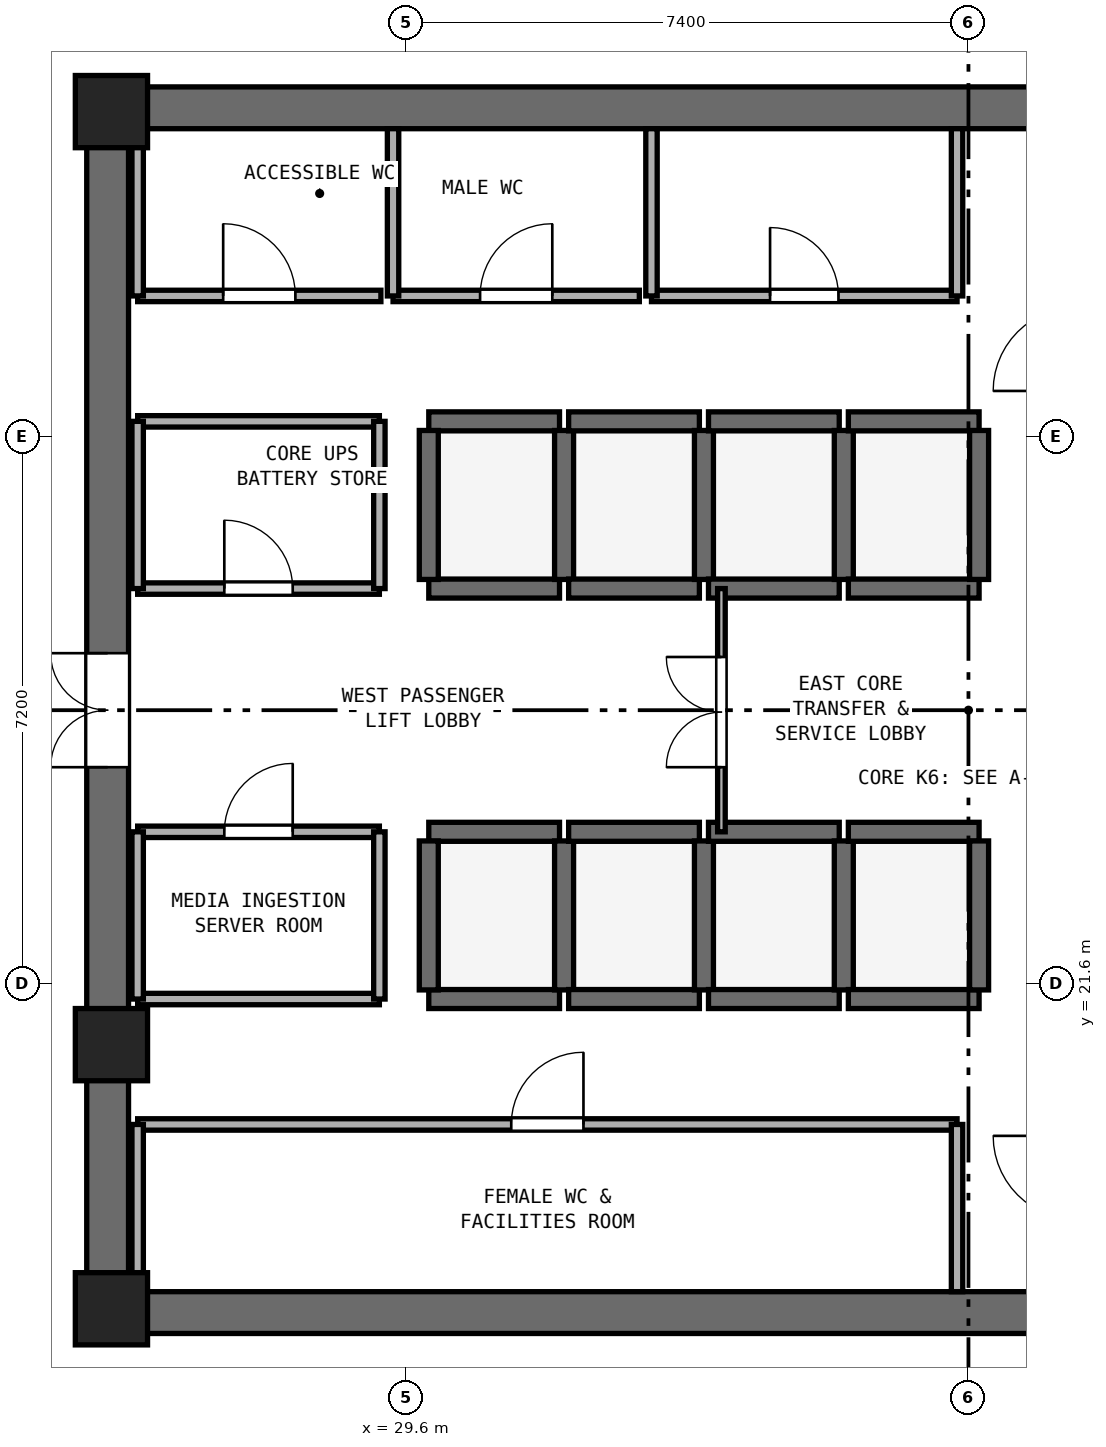
"""IFC4 building model, lengths in metres.
Left out: names, types, materials, properties, quantities, classifications, styles, units other than length and angle.
Written with IfcOpenShell. Run it as: python <this file> out.ifc"""

import sys

from ifc_helpers import new_model, si_unit, direction, frame, frame_2d, origin, origin_2d, place, context, subcontext, project, spatial, rectangle, extrude, element, fill, save


model = new_model("IFC4")
c1 = context("Model", 3, precision=1e-05, world=origin(), true_north=direction((0.0, 1.0)))
c2 = subcontext(c1, "Body", "Model", "MODEL_VIEW")
j1 = project(units=[si_unit("LENGTHUNIT", "METRE"), si_unit("PLANEANGLEUNIT", "RADIAN")], contexts=[c1])
p1 = place(None, origin())
s1 = spatial("IfcSite", under=j1, at=p1, CompositionType="ELEMENT")
p2 = place(p1, origin())
s2 = spatial("IfcBuilding", under=s1, at=p2, CompositionType="ELEMENT")
p3 = place(p2, frame((0.0, 0.0, 220.0)))
s3 = spatial("IfcBuildingStorey", under=s2, at=p3, CompositionType="ELEMENT", Elevation=220.0)
for number, where, z_axis, x_axis in (
    (1, (25.4, 17.275, 0.0), (0.0, 0.0, 1.0), (1.0, 0.0, 0.0)),
    (2, (25.4, 33.125, 0.0), (0.0, 0.0, 1.0), (1.0, 0.0, 0.0)),
):
    element("IfcWall", number, at=place(p3, frame(where, z_axis=z_axis, x_axis=x_axis)), inside=s3, PredefinedType="SHEAR", context=c2, shape_type="SweptSolid", body=[
        extrude(rectangle(XDim=23.2, YDim=0.55, at=frame_2d((11.6, 0.0))), origin(), (0.0, 0.0, 1.0), 4.71),
    ])
p4 = place(p3, frame((25.675, 17.55, 0.0), z_axis=(0.0, 0.0, 1.0), x_axis=(0.0, 1.0, 0.0)))
e3 = element("IfcWall", 3, at=p4, inside=s3, PredefinedType="SHEAR", context=c2, shape_type="SweptSolid", body=[
    extrude(rectangle(XDim=15.3, YDim=0.55, at=frame_2d((7.65, 0.0))), origin(), (0.0, 0.0, 1.0), 4.71),
])
p5 = place(p4, frame((6.9, 0.0, 0.0)))
e4 = element("IfcOpeningElement", 4, at=p5, cuts=e3, PredefinedType="OPENING", context=c2, shape_type="SweptSolid", body=[
    extrude(rectangle(XDim=1.5, YDim=2.15, at=frame_2d((0.75, 1.075))), frame((0.0, 0.285, 0.0), z_axis=(0.0, -1.0, 0.0), x_axis=(1.0, 0.0, 0.0)), (0.0, 0.0, 1.0), 0.57),
])
for number, where, z_axis, x_axis in (
    (5, (25.725, 17.325, 0.0), (0.0, 0.0, 1.0), (1.0, 0.0, 0.0)),
    (6, (25.725, 33.075, 0.0), (0.0, 0.0, 1.0), (1.0, 0.0, 0.0)),
    (7, (25.725, 20.8, 0.0), (0.0, 0.0, 1.0), (1.0, 0.0, 0.0)),
):
    element("IfcColumn", number, at=place(p3, frame(where, z_axis=z_axis, x_axis=x_axis)), inside=s3, PredefinedType="PILASTER", context=c2, shape_type="SweptSolid", body=[
        extrude(rectangle(XDim=0.95, YDim=0.95, at=origin_2d()), origin(), (0.0, 0.0, 1.0), 5.0),
    ])
for number, where, z_axis, x_axis in (
    (8, (29.9, 21.4, 0.0), (0.0, 0.0, 1.0), (1.0, 0.0, 0.0)),
    (9, (29.9, 23.6, 0.0), (0.0, 0.0, 1.0), (1.0, 0.0, 0.0)),
):
    element("IfcWall", number, at=place(p3, frame(where, z_axis=z_axis, x_axis=x_axis)), inside=s3, PredefinedType="SHEAR", context=c2, shape_type="SweptSolid", body=[
        extrude(rectangle(XDim=1.72, YDim=0.25, at=frame_2d((0.86, 0.0))), origin(), (0.0, 0.0, 1.0), 4.71),
    ])
for number, where, z_axis, x_axis in (
    (10, (29.9, 21.52, 0.0), (0.0, 0.0, 1.0), (0.0, 1.0, 0.0)),
    (11, (31.68, 21.52, 0.0), (0.0, 0.0, 1.0), (0.0, 1.0, 0.0)),
):
    element("IfcWall", number, at=place(p3, frame(where, z_axis=z_axis, x_axis=x_axis)), inside=s3, PredefinedType="SHEAR", context=c2, shape_type="SweptSolid", body=[
        extrude(rectangle(XDim=1.96, YDim=0.25, at=frame_2d((0.98, 0.0))), origin(), (0.0, 0.0, 1.0), 4.71),
    ])
for number, where, z_axis, x_axis in (
    (12, (31.74, 21.4, 0.0), (0.0, 0.0, 1.0), (1.0, 0.0, 0.0)),
    (13, (31.74, 23.6, 0.0), (0.0, 0.0, 1.0), (1.0, 0.0, 0.0)),
):
    element("IfcWall", number, at=place(p3, frame(where, z_axis=z_axis, x_axis=x_axis)), inside=s3, PredefinedType="SHEAR", context=c2, shape_type="SweptSolid", body=[
        extrude(rectangle(XDim=1.72, YDim=0.25, at=frame_2d((0.86, 0.0))), origin(), (0.0, 0.0, 1.0), 4.71),
    ])
p6 = place(p3, frame((33.52, 21.52, 0.0), z_axis=(0.0, 0.0, 1.0), x_axis=(0.0, 1.0, 0.0)))
e14 = element("IfcWall", 14, at=p6, inside=s3, PredefinedType="SHEAR", context=c2, shape_type="SweptSolid", body=[
    extrude(rectangle(XDim=1.96, YDim=0.25, at=frame_2d((0.98, 0.0))), origin(), (0.0, 0.0, 1.0), 4.71),
])
for number, where, z_axis, x_axis in (
    (15, (33.58, 21.4, 0.0), (0.0, 0.0, 1.0), (1.0, 0.0, 0.0)),
    (16, (33.58, 23.6, 0.0), (0.0, 0.0, 1.0), (1.0, 0.0, 0.0)),
):
    element("IfcWall", number, at=place(p3, frame(where, z_axis=z_axis, x_axis=x_axis)), inside=s3, PredefinedType="SHEAR", context=c2, shape_type="SweptSolid", body=[
        extrude(rectangle(XDim=1.72, YDim=0.25, at=frame_2d((0.86, 0.0))), origin(), (0.0, 0.0, 1.0), 4.71),
    ])
p7 = place(p3, frame((35.36, 21.52, 0.0), z_axis=(0.0, 0.0, 1.0), x_axis=(0.0, 1.0, 0.0)))
e17 = element("IfcWall", 17, at=p7, inside=s3, PredefinedType="SHEAR", context=c2, shape_type="SweptSolid", body=[
    extrude(rectangle(XDim=1.96, YDim=0.25, at=frame_2d((0.98, 0.0))), origin(), (0.0, 0.0, 1.0), 4.71),
])
for number, where, z_axis, x_axis in (
    (18, (35.42, 21.4, 0.0), (0.0, 0.0, 1.0), (1.0, 0.0, 0.0)),
    (19, (35.42, 23.6, 0.0), (0.0, 0.0, 1.0), (1.0, 0.0, 0.0)),
):
    element("IfcWall", number, at=place(p3, frame(where, z_axis=z_axis, x_axis=x_axis)), inside=s3, PredefinedType="SHEAR", context=c2, shape_type="SweptSolid", body=[
        extrude(rectangle(XDim=1.72, YDim=0.25, at=frame_2d((0.86, 0.0))), origin(), (0.0, 0.0, 1.0), 4.71),
    ])
p8 = place(p3, frame((37.14, 21.52, 0.0), z_axis=(0.0, 0.0, 1.0), x_axis=(0.0, 1.0, 0.0)))
e20 = element("IfcWall", 20, at=p8, inside=s3, PredefinedType="SHEAR", context=c2, shape_type="SweptSolid", body=[
    extrude(rectangle(XDim=1.96, YDim=0.25, at=frame_2d((0.98, 0.0))), origin(), (0.0, 0.0, 1.0), 4.71),
])
for number, where, z_axis, x_axis in (
    (21, (29.9, 26.8, 0.0), (0.0, 0.0, 1.0), (1.0, 0.0, 0.0)),
    (22, (29.9, 29.0, 0.0), (0.0, 0.0, 1.0), (1.0, 0.0, 0.0)),
):
    element("IfcWall", number, at=place(p3, frame(where, z_axis=z_axis, x_axis=x_axis)), inside=s3, PredefinedType="SHEAR", context=c2, shape_type="SweptSolid", body=[
        extrude(rectangle(XDim=1.72, YDim=0.25, at=frame_2d((0.86, 0.0))), origin(), (0.0, 0.0, 1.0), 4.71),
    ])
for number, where, z_axis, x_axis in (
    (23, (29.9, 26.92, 0.0), (0.0, 0.0, 1.0), (0.0, 1.0, 0.0)),
    (24, (31.68, 26.92, 0.0), (0.0, 0.0, 1.0), (0.0, 1.0, 0.0)),
):
    element("IfcWall", number, at=place(p3, frame(where, z_axis=z_axis, x_axis=x_axis)), inside=s3, PredefinedType="SHEAR", context=c2, shape_type="SweptSolid", body=[
        extrude(rectangle(XDim=1.96, YDim=0.25, at=frame_2d((0.98, 0.0))), origin(), (0.0, 0.0, 1.0), 4.71),
    ])
for number, where, z_axis, x_axis in (
    (25, (31.74, 26.8, 0.0), (0.0, 0.0, 1.0), (1.0, 0.0, 0.0)),
    (26, (31.74, 29.0, 0.0), (0.0, 0.0, 1.0), (1.0, 0.0, 0.0)),
):
    element("IfcWall", number, at=place(p3, frame(where, z_axis=z_axis, x_axis=x_axis)), inside=s3, PredefinedType="SHEAR", context=c2, shape_type="SweptSolid", body=[
        extrude(rectangle(XDim=1.72, YDim=0.25, at=frame_2d((0.86, 0.0))), origin(), (0.0, 0.0, 1.0), 4.71),
    ])
p9 = place(p3, frame((33.52, 26.92, 0.0), z_axis=(0.0, 0.0, 1.0), x_axis=(0.0, 1.0, 0.0)))
e27 = element("IfcWall", 27, at=p9, inside=s3, PredefinedType="SHEAR", context=c2, shape_type="SweptSolid", body=[
    extrude(rectangle(XDim=1.96, YDim=0.25, at=frame_2d((0.98, 0.0))), origin(), (0.0, 0.0, 1.0), 4.71),
])
for number, where, z_axis, x_axis in (
    (28, (33.58, 26.8, 0.0), (0.0, 0.0, 1.0), (1.0, 0.0, 0.0)),
    (29, (33.58, 29.0, 0.0), (0.0, 0.0, 1.0), (1.0, 0.0, 0.0)),
):
    element("IfcWall", number, at=place(p3, frame(where, z_axis=z_axis, x_axis=x_axis)), inside=s3, PredefinedType="SHEAR", context=c2, shape_type="SweptSolid", body=[
        extrude(rectangle(XDim=1.72, YDim=0.25, at=frame_2d((0.86, 0.0))), origin(), (0.0, 0.0, 1.0), 4.71),
    ])
p10 = place(p3, frame((35.36, 26.92, 0.0), z_axis=(0.0, 0.0, 1.0), x_axis=(0.0, 1.0, 0.0)))
e30 = element("IfcWall", 30, at=p10, inside=s3, PredefinedType="SHEAR", context=c2, shape_type="SweptSolid", body=[
    extrude(rectangle(XDim=1.96, YDim=0.25, at=frame_2d((0.98, 0.0))), origin(), (0.0, 0.0, 1.0), 4.71),
])
for number, where, z_axis, x_axis in (
    (31, (35.42, 26.8, 0.0), (0.0, 0.0, 1.0), (1.0, 0.0, 0.0)),
    (32, (35.42, 29.0, 0.0), (0.0, 0.0, 1.0), (1.0, 0.0, 0.0)),
):
    element("IfcWall", number, at=place(p3, frame(where, z_axis=z_axis, x_axis=x_axis)), inside=s3, PredefinedType="SHEAR", context=c2, shape_type="SweptSolid", body=[
        extrude(rectangle(XDim=1.72, YDim=0.25, at=frame_2d((0.86, 0.0))), origin(), (0.0, 0.0, 1.0), 4.71),
    ])
p11 = place(p3, frame((37.14, 26.92, 0.0), z_axis=(0.0, 0.0, 1.0), x_axis=(0.0, 1.0, 0.0)))
e33 = element("IfcWall", 33, at=p11, inside=s3, PredefinedType="SHEAR", context=c2, shape_type="SweptSolid", body=[
    extrude(rectangle(XDim=1.96, YDim=0.25, at=frame_2d((0.98, 0.0))), origin(), (0.0, 0.0, 1.0), 4.71),
])
p12 = place(p3, frame((26.07, 30.65, 0.0), z_axis=(0.0, 0.0, 1.0), x_axis=(1.0, 0.0, 0.0)))
e34 = element("IfcWall", 34, at=p12, inside=s3, PredefinedType="PARTITIONING", context=c2, shape_type="SweptSolid", body=[
    extrude(rectangle(XDim=3.2, YDim=0.15, at=frame_2d((1.6, 0.0))), origin(), (0.0, 0.0, 1.0), 4.71),
])
p13 = place(p12, frame((1.125, 0.0, 0.0)))
e35 = element("IfcOpeningElement", 35, at=p13, cuts=e34, PredefinedType="OPENING", context=c2, shape_type="SweptSolid", body=[
    extrude(rectangle(XDim=0.95, YDim=2.1, at=frame_2d((0.475, 1.05))), frame((0.0, 0.085, 0.0), z_axis=(0.0, -1.0, 0.0), x_axis=(1.0, 0.0, 0.0)), (0.0, 0.0, 1.0), 0.17),
])
p14 = place(p3, frame((26.07, 30.65, 0.0), z_axis=(0.0, 0.0, 1.0), x_axis=(0.0, 1.0, 0.0)))
e36 = element("IfcWall", 36, at=p14, inside=s3, PredefinedType="PARTITIONING", context=c2, shape_type="SweptSolid", body=[
    extrude(rectangle(XDim=2.2, YDim=0.15, at=frame_2d((1.1, 0.0))), origin(), (0.0, 0.0, 1.0), 3.81),
])
p15 = place(p3, frame((29.43, 30.65, 0.0), z_axis=(0.0, 0.0, 1.0), x_axis=(1.0, 0.0, 0.0)))
e37 = element("IfcWall", 37, at=p15, inside=s3, PredefinedType="PARTITIONING", context=c2, shape_type="SweptSolid", body=[
    extrude(rectangle(XDim=3.24, YDim=0.15, at=frame_2d((1.62, 0.0))), origin(), (0.0, 0.0, 1.0), 4.71),
])
p16 = place(p15, frame((1.145, 0.0, 0.0)))
e38 = element("IfcOpeningElement", 38, at=p16, cuts=e37, PredefinedType="OPENING", context=c2, shape_type="SweptSolid", body=[
    extrude(rectangle(XDim=0.95, YDim=2.1, at=frame_2d((0.475, 1.05))), frame((0.0, 0.085, 0.0), z_axis=(0.0, -1.0, 0.0), x_axis=(1.0, 0.0, 0.0)), (0.0, 0.0, 1.0), 0.17),
])
p17 = place(p3, frame((29.43, 30.65, 0.0), z_axis=(0.0, 0.0, 1.0), x_axis=(0.0, 1.0, 0.0)))
e39 = element("IfcWall", 39, at=p17, inside=s3, PredefinedType="PARTITIONING", context=c2, shape_type="SweptSolid", body=[
    extrude(rectangle(XDim=2.2, YDim=0.15, at=frame_2d((1.1, 0.0))), origin(), (0.0, 0.0, 1.0), 4.71),
])
p18 = place(p3, frame((32.83, 30.65, 0.0), z_axis=(0.0, 0.0, 1.0), x_axis=(1.0, 0.0, 0.0)))
e40 = element("IfcWall", 40, at=p18, inside=s3, PredefinedType="PARTITIONING", context=c2, shape_type="SweptSolid", body=[
    extrude(rectangle(XDim=4.02, YDim=0.15, at=frame_2d((2.01, 0.0))), origin(), (0.0, 0.0, 1.0), 4.71),
])
p19 = place(p18, frame((1.56, 0.0, 0.0)))
e41 = element("IfcOpeningElement", 41, at=p19, cuts=e40, PredefinedType="OPENING", context=c2, shape_type="SweptSolid", body=[
    extrude(rectangle(XDim=0.9, YDim=2.1, at=frame_2d((0.45, 1.05))), frame((0.0, 0.085, 0.0), z_axis=(0.0, -1.0, 0.0), x_axis=(1.0, 0.0, 0.0)), (0.0, 0.0, 1.0), 0.17),
])
for number, where, z_axis, x_axis in (
    (42, (32.83, 30.65, 0.0), (0.0, 0.0, 1.0), (0.0, 1.0, 0.0)),
    (43, (36.85, 30.65, 0.0), (0.0, 0.0, 1.0), (0.0, 1.0, 0.0)),
):
    element("IfcWall", number, at=place(p3, frame(where, z_axis=z_axis, x_axis=x_axis)), inside=s3, PredefinedType="PARTITIONING", context=c2, shape_type="SweptSolid", body=[
        extrude(rectangle(XDim=2.2, YDim=0.15, at=frame_2d((1.1, 0.0))), origin(), (0.0, 0.0, 1.0), 4.71),
    ])
p20 = place(p3, frame((26.07, 19.75, 0.0), z_axis=(0.0, 0.0, 1.0), x_axis=(1.0, 0.0, 0.0)))
e44 = element("IfcWall", 44, at=p20, inside=s3, PredefinedType="PARTITIONING", context=c2, shape_type="SweptSolid", body=[
    extrude(rectangle(XDim=10.78, YDim=0.15, at=frame_2d((5.39, 0.0))), origin(), (0.0, 0.0, 1.0), 4.71),
])
p21 = place(p20, frame((4.915, 0.0, 0.0)))
e45 = element("IfcOpeningElement", 45, at=p21, cuts=e44, PredefinedType="OPENING", context=c2, shape_type="SweptSolid", body=[
    extrude(rectangle(XDim=0.95, YDim=2.1, at=frame_2d((0.475, 1.05))), frame((0.0, 0.085, 0.0), z_axis=(0.0, -1.0, 0.0), x_axis=(1.0, 0.0, 0.0)), (0.0, 0.0, 1.0), 0.17),
])
p22 = place(p3, frame((26.07, 17.55, 0.0), z_axis=(0.0, 0.0, 1.0), x_axis=(0.0, 1.0, 0.0)))
e46 = element("IfcWall", 46, at=p22, inside=s3, PredefinedType="PARTITIONING", context=c2, shape_type="SweptSolid", body=[
    extrude(rectangle(XDim=2.2, YDim=0.15, at=frame_2d((1.1, 0.0))), origin(), (0.0, 0.0, 1.0), 3.81),
])
p23 = place(p3, frame((36.85, 17.55, 0.0), z_axis=(0.0, 0.0, 1.0), x_axis=(0.0, 1.0, 0.0)))
e47 = element("IfcWall", 47, at=p23, inside=s3, PredefinedType="PARTITIONING", context=c2, shape_type="SweptSolid", body=[
    extrude(rectangle(XDim=2.2, YDim=0.15, at=frame_2d((1.1, 0.0))), origin(), (0.0, 0.0, 1.0), 4.71),
])
p24 = place(p3, frame((26.07, 26.8, 0.0), z_axis=(0.0, 0.0, 1.0), x_axis=(1.0, 0.0, 0.0)))
e48 = element("IfcWall", 48, at=p24, inside=s3, PredefinedType="PARTITIONING", context=c2, shape_type="SweptSolid", body=[
    extrude(rectangle(XDim=3.18, YDim=0.15, at=frame_2d((1.59, 0.0))), origin(), (0.0, 0.0, 1.0), 4.71),
])
p25 = place(p24, frame((1.14, 0.0, 0.0)))
e49 = element("IfcOpeningElement", 49, at=p25, cuts=e48, PredefinedType="OPENING", context=c2, shape_type="SweptSolid", body=[
    extrude(rectangle(XDim=0.9, YDim=2.1, at=frame_2d((0.45, 1.05))), frame((0.0, 0.085, 0.0), z_axis=(0.0, -1.0, 0.0), x_axis=(1.0, 0.0, 0.0)), (0.0, 0.0, 1.0), 0.17),
])
p26 = place(p3, frame((26.07, 29.0, 0.0), z_axis=(0.0, 0.0, 1.0), x_axis=(1.0, 0.0, 0.0)))
e50 = element("IfcWall", 50, at=p26, inside=s3, PredefinedType="PARTITIONING", context=c2, shape_type="SweptSolid", body=[
    extrude(rectangle(XDim=3.18, YDim=0.15, at=frame_2d((1.59, 0.0))), origin(), (0.0, 0.0, 1.0), 4.71),
])
p27 = place(p3, frame((26.07, 26.8, 0.0), z_axis=(0.0, 0.0, 1.0), x_axis=(0.0, 1.0, 0.0)))
e51 = element("IfcWall", 51, at=p27, inside=s3, PredefinedType="PARTITIONING", context=c2, shape_type="SweptSolid", body=[
    extrude(rectangle(XDim=2.2, YDim=0.15, at=frame_2d((1.1, 0.0))), origin(), (0.0, 0.0, 1.0), 3.81),
])
p28 = place(p3, frame((29.25, 26.8, 0.0), z_axis=(0.0, 0.0, 1.0), x_axis=(0.0, 1.0, 0.0)))
e52 = element("IfcWall", 52, at=p28, inside=s3, PredefinedType="PARTITIONING", context=c2, shape_type="SweptSolid", body=[
    extrude(rectangle(XDim=2.2, YDim=0.15, at=frame_2d((1.1, 0.0))), origin(), (0.0, 0.0, 1.0), 4.71),
])
p29 = place(p3, frame((26.07, 21.4, 0.0), z_axis=(0.0, 0.0, 1.0), x_axis=(1.0, 0.0, 0.0)))
e53 = element("IfcWall", 53, at=p29, inside=s3, PredefinedType="PARTITIONING", context=c2, shape_type="SweptSolid", body=[
    extrude(rectangle(XDim=3.18, YDim=0.15, at=frame_2d((1.59, 0.0))), origin(), (0.0, 0.0, 1.0), 4.71),
])
p30 = place(p3, frame((26.07, 23.6, 0.0), z_axis=(0.0, 0.0, 1.0), x_axis=(1.0, 0.0, 0.0)))
e54 = element("IfcWall", 54, at=p30, inside=s3, PredefinedType="PARTITIONING", context=c2, shape_type="SweptSolid", body=[
    extrude(rectangle(XDim=3.18, YDim=0.15, at=frame_2d((1.59, 0.0))), origin(), (0.0, 0.0, 1.0), 4.71),
])
p31 = place(p30, frame((1.14, 0.0, 0.0)))
e55 = element("IfcOpeningElement", 55, at=p31, cuts=e54, PredefinedType="OPENING", context=c2, shape_type="SweptSolid", body=[
    extrude(rectangle(XDim=0.9, YDim=2.1, at=frame_2d((0.45, 1.05))), frame((0.0, 0.085, 0.0), z_axis=(0.0, -1.0, 0.0), x_axis=(1.0, 0.0, 0.0)), (0.0, 0.0, 1.0), 0.17),
])
p32 = place(p3, frame((26.07, 21.4, 0.0), z_axis=(0.0, 0.0, 1.0), x_axis=(0.0, 1.0, 0.0)))
e56 = element("IfcWall", 56, at=p32, inside=s3, PredefinedType="PARTITIONING", context=c2, shape_type="SweptSolid", body=[
    extrude(rectangle(XDim=2.2, YDim=0.15, at=frame_2d((1.1, 0.0))), origin(), (0.0, 0.0, 1.0), 3.81),
])
p33 = place(p3, frame((29.25, 21.4, 0.0), z_axis=(0.0, 0.0, 1.0), x_axis=(0.0, 1.0, 0.0)))
e57 = element("IfcWall", 57, at=p33, inside=s3, PredefinedType="PARTITIONING", context=c2, shape_type="SweptSolid", body=[
    extrude(rectangle(XDim=2.2, YDim=0.15, at=frame_2d((1.1, 0.0))), origin(), (0.0, 0.0, 1.0), 4.71),
])
p34 = place(p3, frame((33.75, 23.6, 0.0), z_axis=(0.0, 0.0, 1.0), x_axis=(0.0, 1.0, 0.0)))
e58 = element("IfcWall", 58, at=p34, inside=s3, PredefinedType="PARTITIONING", context=c2, shape_type="SweptSolid", body=[
    extrude(rectangle(XDim=3.2, YDim=0.1, at=frame_2d((1.6, 0.0))), origin(), (0.0, 0.0, 1.0), 4.71),
])
p35 = place(p34, frame((0.85, 0.0, 0.0)))
e59 = element("IfcOpeningElement", 59, at=p35, cuts=e58, PredefinedType="OPENING", context=c2, shape_type="SweptSolid", body=[
    extrude(rectangle(XDim=1.45, YDim=2.12, at=frame_2d((0.725, 1.06))), frame((0.0, 0.06, 0.0), z_axis=(0.0, -1.0, 0.0), x_axis=(1.0, 0.0, 0.0)), (0.0, 0.0, 1.0), 0.12),
])
p36 = place(p5, origin())
e60 = element("IfcDoor", 60, at=p36, inside=s3, OperationType="DOUBLE_DOOR_SINGLE_SWING", PredefinedType="DOOR", context=c2, shape_type="SweptSolid", body=[
    extrude(rectangle(XDim=1.5, YDim=2.15, at=frame_2d((0.75, 1.075))), frame((0.0, 0.025, 0.0), z_axis=(0.0, -1.0, 0.0), x_axis=(1.0, 0.0, 0.0)), (0.0, 0.0, 1.0), 0.05),
])
fill(e4, e60)
p37 = place(p13, origin())
e61 = element("IfcDoor", 61, at=p37, inside=s3, OperationType="SINGLE_SWING_LEFT", PredefinedType="DOOR", context=c2, shape_type="SweptSolid", body=[
    extrude(rectangle(XDim=0.95, YDim=2.1, at=frame_2d((0.475, 1.05))), frame((0.0, 0.025, 0.0), z_axis=(0.0, -1.0, 0.0), x_axis=(1.0, 0.0, 0.0)), (0.0, 0.0, 1.0), 0.05),
])
fill(e35, e61)
p38 = place(p16, origin())
e62 = element("IfcDoor", 62, at=p38, inside=s3, OperationType="SINGLE_SWING_RIGHT", PredefinedType="DOOR", context=c2, shape_type="SweptSolid", body=[
    extrude(rectangle(XDim=0.95, YDim=2.1, at=frame_2d((0.475, 1.05))), frame((0.0, 0.025, 0.0), z_axis=(0.0, -1.0, 0.0), x_axis=(1.0, 0.0, 0.0)), (0.0, 0.0, 1.0), 0.05),
])
fill(e38, e62)
p39 = place(p19, origin())
e63 = element("IfcDoor", 63, at=p39, inside=s3, OperationType="SINGLE_SWING_LEFT", PredefinedType="DOOR", context=c2, shape_type="SweptSolid", body=[
    extrude(rectangle(XDim=0.9, YDim=2.1, at=frame_2d((0.45, 1.05))), frame((0.0, 0.025, 0.0), z_axis=(0.0, -1.0, 0.0), x_axis=(1.0, 0.0, 0.0)), (0.0, 0.0, 1.0), 0.05),
])
fill(e41, e63)
p40 = place(p21, origin())
e64 = element("IfcDoor", 64, at=p40, inside=s3, OperationType="SINGLE_SWING_RIGHT", PredefinedType="DOOR", context=c2, shape_type="SweptSolid", body=[
    extrude(rectangle(XDim=0.95, YDim=2.1, at=frame_2d((0.475, 1.05))), frame((0.0, 0.025, 0.0), z_axis=(0.0, -1.0, 0.0), x_axis=(1.0, 0.0, 0.0)), (0.0, 0.0, 1.0), 0.05),
])
fill(e45, e64)
p41 = place(p25, origin())
e65 = element("IfcDoor", 65, at=p41, inside=s3, OperationType="SINGLE_SWING_LEFT", PredefinedType="DOOR", context=c2, shape_type="SweptSolid", body=[
    extrude(rectangle(XDim=0.9, YDim=2.1, at=frame_2d((0.45, 1.05))), frame((0.0, 0.025, 0.0), z_axis=(0.0, -1.0, 0.0), x_axis=(1.0, 0.0, 0.0)), (0.0, 0.0, 1.0), 0.05),
])
fill(e49, e65)
p42 = place(p31, origin())
e66 = element("IfcDoor", 66, at=p42, inside=s3, OperationType="SINGLE_SWING_RIGHT", PredefinedType="DOOR", context=c2, shape_type="SweptSolid", body=[
    extrude(rectangle(XDim=0.9, YDim=2.1, at=frame_2d((0.45, 1.05))), frame((0.0, 0.025, 0.0), z_axis=(0.0, -1.0, 0.0), x_axis=(1.0, 0.0, 0.0)), (0.0, 0.0, 1.0), 0.05),
])
fill(e55, e66)
p43 = place(p35, origin())
e67 = element("IfcDoor", 67, at=p43, inside=s3, OperationType="DOUBLE_DOOR_SINGLE_SWING", PredefinedType="DOOR", context=c2, shape_type="SweptSolid", body=[
    extrude(rectangle(XDim=1.45, YDim=2.12, at=frame_2d((0.725, 1.06))), frame((0.0, 0.025, 0.0), z_axis=(0.0, -1.0, 0.0), x_axis=(1.0, 0.0, 0.0)), (0.0, 0.0, 1.0), 0.05),
])
fill(e59, e67)
save(model, sys.argv[1])
